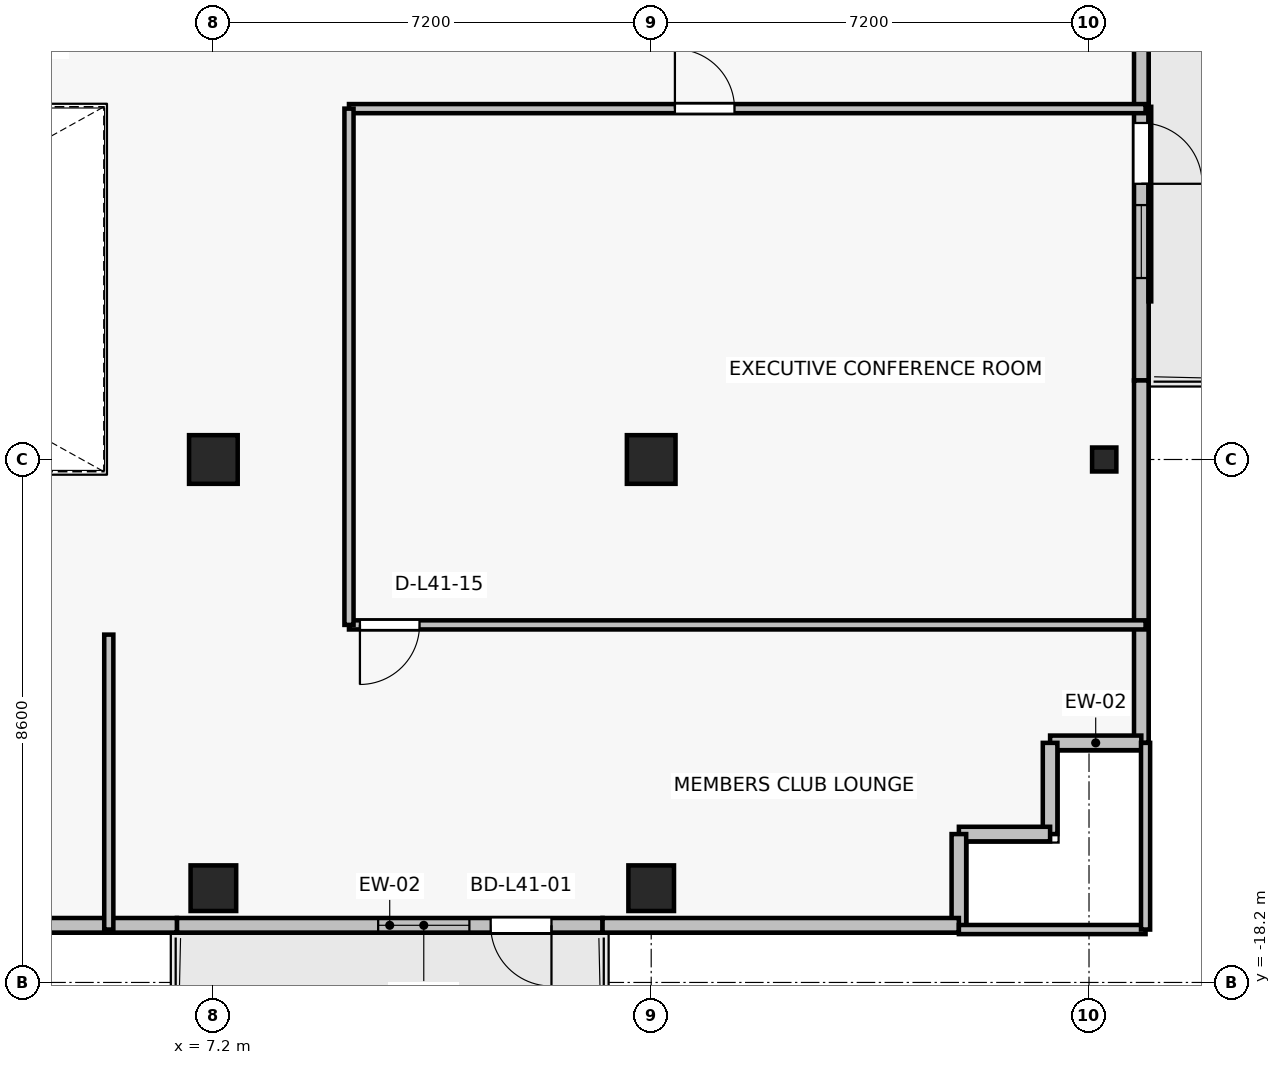
"""IFC4 building model, lengths in metres.
Left out: names, types, materials, properties, quantities, classifications, styles, units other than length and angle.
Written with IfcOpenShell. Run it as: python <this file> out.ifc"""

import sys

from ifc_helpers import new_model, si_unit, direction, frame, frame_2d, origin, origin_2d, place, context, subcontext, project, spatial, rectangle, i_section, extrude, source, transform, mapped, element, fill, save


model = new_model("IFC4")
c1 = context("Model", 3, precision=1e-05, world=origin(), true_north=direction((0.0, 1.0)))
c2 = subcontext(c1, "Body", "Model", "MODEL_VIEW")
j1 = project(units=[si_unit("LENGTHUNIT", "METRE"), si_unit("PLANEANGLEUNIT", "RADIAN")], contexts=[c1])
p1 = place(None, origin())
s1 = spatial("IfcSite", under=j1, at=p1, CompositionType="ELEMENT")
p2 = place(p1, origin())
s2 = spatial("IfcBuilding", under=s1, at=p2, CompositionType="ELEMENT")
p3 = place(p2, frame((0.0, 0.0, 149.5)))
s3 = spatial("IfcBuildingStorey", under=s2, at=p3, CompositionType="ELEMENT", Elevation=149.5)
for number, where, z_axis, x_axis in (
    (1, (7.2, -9.6, 0.0), (0.0, 0.0, 1.0), (1.0, 0.0, 0.0)),
    (2, (14.4, -9.6, 0.0), (0.0, 0.0, 1.0), (1.0, 0.0, 0.0)),
):
    element("IfcColumn", number, at=place(p3, frame(where, z_axis=z_axis, x_axis=x_axis)), inside=s3, PredefinedType="COLUMN", context=c2, shape_type="SweptSolid", body=[
        extrude(rectangle(XDim=0.8, YDim=0.8, at=origin_2d()), origin(), (0.0, 0.0, 1.0), 3.3),
    ])
for number, where, z_axis, x_axis in (
    (3, (7.2, -16.65, 0.0), (0.0, 0.0, 1.0), (1.0, 0.0, 0.0)),
    (4, (14.4, -16.65, 0.0), (0.0, 0.0, 1.0), (1.0, 0.0, 0.0)),
):
    element("IfcColumn", number, at=place(p3, frame(where, z_axis=z_axis, x_axis=x_axis)), inside=s3, PredefinedType="COLUMN", context=c2, shape_type="SweptSolid", body=[
        extrude(rectangle(XDim=0.75, YDim=0.75, at=origin_2d()), origin(), (0.0, 0.0, 1.0), 3.3),
    ])
p4 = place(p3, frame((21.85, -9.6, 0.0), z_axis=(0.0, 0.0, 1.0), x_axis=(1.0, 0.0, 0.0)))
e5 = element("IfcColumn", 5, at=p4, inside=s3, PredefinedType="COLUMN", context=c2, shape_type="SweptSolid", body=[
    extrude(i_section(OverallWidth=0.399, OverallDepth=0.394, WebThickness=0.023, FlangeThickness=0.037, FilletRadius=0.015, at=origin_2d()), origin(), (0.0, 0.0, 1.0), 3.3),
])
p5 = place(p3, frame((13.6, -17.26, 0.0), z_axis=(0.0, 0.0, 1.0), x_axis=(-1.0, 0.0, 0.0)))
e6 = element("IfcWall", 6, at=p5, inside=s3, PredefinedType="SOLIDWALL", context=c2, shape_type="SweptSolid", body=[
    extrude(rectangle(XDim=7.0, YDim=0.24, at=frame_2d((3.5, 0.0))), origin(), (0.0, 0.0, 1.0), 2.665),
])
p6 = place(p5, frame((0.84, 0.0, 0.0)))
e7 = element("IfcOpeningElement", 7, at=p6, cuts=e6, PredefinedType="OPENING", context=c2, shape_type="SweptSolid", body=[
    extrude(rectangle(XDim=1.0, YDim=2.2, at=frame_2d((0.5, 1.1))), frame((0.0, 0.13, 0.0), z_axis=(0.0, -1.0, 0.0), x_axis=(1.0, 0.0, 0.0)), (0.0, 0.0, 1.0), 0.26),
])
p7 = place(p5, frame((2.19, 0.0, 0.85)))
e8 = element("IfcOpeningElement", 8, at=p7, cuts=e6, PredefinedType="OPENING", context=c2, shape_type="SweptSolid", body=[
    extrude(rectangle(XDim=1.5, YDim=1.6, at=frame_2d((0.75, 0.8))), frame((0.0, 0.13, 0.0), z_axis=(0.0, -1.0, 0.0), x_axis=(1.0, 0.0, 0.0)), (0.0, 0.0, 1.0), 0.26),
])
p8 = place(p3, frame((22.46, -2.5, 0.0), z_axis=(0.0, 0.0, 1.0), x_axis=(0.0, -1.0, 0.0)))
e9 = element("IfcWall", 9, at=p8, inside=s3, PredefinedType="SOLIDWALL", context=c2, shape_type="SweptSolid", body=[
    extrude(rectangle(XDim=5.8, YDim=0.24, at=frame_2d((2.9, 0.0))), origin(), (0.0, 0.0, 1.0), 3.075),
])
p9 = place(p8, frame((1.566, 0.0, 0.0)))
e10 = element("IfcOpeningElement", 10, at=p9, cuts=e9, PredefinedType="OPENING", context=c2, shape_type="SweptSolid", body=[
    extrude(rectangle(XDim=1.0, YDim=2.2, at=frame_2d((0.5, 1.1))), frame((0.0, 0.13, 0.0), z_axis=(0.0, -1.0, 0.0), x_axis=(1.0, 0.0, 0.0)), (0.0, 0.0, 1.0), 0.26),
])
p10 = place(p8, frame((2.916, 0.0, 0.85)))
e11 = element("IfcOpeningElement", 11, at=p10, cuts=e9, PredefinedType="OPENING", context=c2, shape_type="SweptSolid", body=[
    extrude(rectangle(XDim=1.2, YDim=1.5, at=frame_2d((0.6, 0.75))), frame((0.0, 0.13, 0.0), z_axis=(0.0, -1.0, 0.0), x_axis=(1.0, 0.0, 0.0)), (0.0, 0.0, 1.0), 0.26),
])
p11 = place(p3, frame((22.46, -14.26, 0.0), z_axis=(0.0, 0.0, 1.0), x_axis=(0.0, 1.0, 0.0)))
e12 = element("IfcWall", 12, at=p11, inside=s3, PredefinedType="SOLIDWALL", context=c2, shape_type="SweptSolid", body=[
    extrude(rectangle(XDim=5.96, YDim=0.24, at=frame_2d((2.98, 0.0))), origin(), (0.0, 0.0, 1.0), 3.075),
])
for number, where, z_axis, x_axis in (
    (13, (20.96, -14.26, 0.0), (0.0, 0.0, 1.0), (1.0, 0.0, 0.0)),
    (14, (20.96, -15.76, 0.0), (0.0, 0.0, 1.0), (0.0, 1.0, 0.0)),
    (15, (19.46, -15.76, 0.0), (0.0, 0.0, 1.0), (1.0, 0.0, 0.0)),
    (16, (19.46, -17.26, 0.0), (0.0, 0.0, 1.0), (0.0, 1.0, 0.0)),
):
    element("IfcWall", number, at=place(p3, frame(where, z_axis=z_axis, x_axis=x_axis)), inside=s3, PredefinedType="SOLIDWALL", context=c2, shape_type="SweptSolid", body=[
        extrude(rectangle(XDim=1.5, YDim=0.24, at=frame_2d((0.75, 0.0))), origin(), (0.0, 0.0, 1.0), 3.075),
    ])
p12 = place(p3, frame((13.6, -17.26, 0.0), z_axis=(0.0, 0.0, 1.0), x_axis=(1.0, 0.0, 0.0)))
e17 = element("IfcWall", 17, at=p12, inside=s3, PredefinedType="SOLIDWALL", context=c2, shape_type="SweptSolid", body=[
    extrude(rectangle(XDim=5.86, YDim=0.24, at=frame_2d((2.93, 0.0))), origin(), (0.0, 0.0, 1.0), 2.665),
])
p13 = place(p3, frame((3.2, -17.26, 0.0), z_axis=(0.0, 0.0, 1.0), x_axis=(1.0, 0.0, 0.0)))
e18 = element("IfcWall", 18, at=p13, inside=s3, PredefinedType="SOLIDWALL", context=c2, shape_type="SweptSolid", body=[
    extrude(rectangle(XDim=3.4, YDim=0.24, at=frame_2d((1.7, 0.0))), origin(), (0.0, 0.0, 1.0), 3.075),
])
p14 = place(p3, frame((22.53, -12.32, 0.0), z_axis=(0.0, 0.0, 1.0), x_axis=(-1.0, 0.0, 0.0)))
e19 = element("IfcWall", 19, at=p14, inside=s3, PredefinedType="PARTITIONING", context=c2, shape_type="SweptSolid", body=[
    extrude(rectangle(XDim=13.1, YDim=0.15, at=frame_2d((6.55, 0.0))), origin(), (0.0, 0.0, 1.0), 2.565),
])
p15 = place(p14, frame((11.94, 0.0, 0.0)))
e20 = element("IfcOpeningElement", 20, at=p15, cuts=e19, PredefinedType="OPENING", context=c2, shape_type="SweptSolid", body=[
    extrude(rectangle(XDim=0.98, YDim=2.15, at=frame_2d((0.49, 1.075))), frame((0.0, 0.085, 0.0), z_axis=(0.0, -1.0, 0.0), x_axis=(1.0, 0.0, 0.0)), (0.0, 0.0, 1.0), 0.17),
])
p16 = place(p3, frame((9.43, -3.83, 0.0), z_axis=(0.0, 0.0, 1.0), x_axis=(1.0, 0.0, 0.0)))
e21 = element("IfcWall", 21, at=p16, inside=s3, PredefinedType="PARTITIONING", context=c2, shape_type="SweptSolid", body=[
    extrude(rectangle(XDim=13.1, YDim=0.15, at=frame_2d((6.55, 0.0))), origin(), (0.0, 0.0, 1.0), 2.565),
])
p17 = place(p16, frame((5.36, 0.0, 0.0)))
e22 = element("IfcOpeningElement", 22, at=p17, cuts=e21, PredefinedType="OPENING", context=c2, shape_type="SweptSolid", body=[
    extrude(rectangle(XDim=0.98, YDim=2.15, at=frame_2d((0.49, 1.075))), frame((0.0, 0.085, 0.0), z_axis=(0.0, -1.0, 0.0), x_axis=(1.0, 0.0, 0.0)), (0.0, 0.0, 1.0), 0.17),
])
p18 = place(p3, frame((9.43, -12.32, 0.0), z_axis=(0.0, 0.0, 1.0), x_axis=(0.0, 1.0, 0.0)))
e23 = element("IfcWall", 23, at=p18, inside=s3, PredefinedType="PARTITIONING", context=c2, shape_type="SweptSolid", body=[
    extrude(rectangle(XDim=8.49, YDim=0.15, at=frame_2d((4.245, 0.0))), origin(), (0.0, 0.0, 1.0), 2.565),
])
p19 = place(p3, frame((22.53, -17.33, 0.0), z_axis=(0.0, 0.0, 1.0), x_axis=(-1.0, 0.0, 0.0)))
e24 = element("IfcWall", 24, at=p19, inside=s3, PredefinedType="PARTITIONING", context=c2, shape_type="SweptSolid", body=[
    extrude(rectangle(XDim=3.07, YDim=0.15, at=frame_2d((1.535, 0.0))), origin(), (0.0, 0.0, 1.0), 2.665),
])
p20 = place(p3, frame((5.48, -17.33, 0.0), z_axis=(0.0, 0.0, 1.0), x_axis=(0.0, 1.0, 0.0)))
e25 = element("IfcWall", 25, at=p20, inside=s3, PredefinedType="PARTITIONING", context=c2, shape_type="SweptSolid", body=[
    extrude(rectangle(XDim=4.85, YDim=0.15, at=frame_2d((2.425, 0.0))), origin(), (0.0, 0.0, 1.0), 2.565),
])
p21 = place(p3, frame((22.53, -14.26, 0.0), z_axis=(0.0, 0.0, 1.0), x_axis=(0.0, -1.0, 0.0)))
e26 = element("IfcWall", 26, at=p21, inside=s3, PredefinedType="PARTITIONING", context=c2, shape_type="SweptSolid", body=[
    extrude(rectangle(XDim=3.07, YDim=0.15, at=frame_2d((1.535, 0.0))), origin(), (0.0, 0.0, 1.0), 3.075),
])
m1 = source(origin(), c2, "Body", "SweptSolid", [
    extrude(rectangle(XDim=1.0, YDim=2.2, at=frame_2d((0.5, 1.1))), frame((0.0, 0.025, 0.0), z_axis=(0.0, -1.0, 0.0), x_axis=(1.0, 0.0, 0.0)), (0.0, 0.0, 1.0), 0.05),
])
p22 = place(p6, origin())
e27 = element("IfcDoor", 27, at=p22, inside=s3, OperationType="SINGLE_SWING_LEFT", PredefinedType="DOOR", context=c2, shape_type="MappedRepresentation", body=[
    mapped(m1, transform((0.0, 0.0, 0.0), x_axis=(1.0, 0.0, 0.0), y_axis=(0.0, 1.0, 0.0), z_axis=(0.0, 0.0, 1.0), scale=1.0)),
])
fill(e7, e27)
m2 = source(origin(), c2, "Body", "SweptSolid", [
    extrude(rectangle(XDim=1.5, YDim=1.6, at=frame_2d((0.75, 0.8))), frame((0.0, 0.03, 0.0), z_axis=(0.0, -1.0, 0.0), x_axis=(1.0, 0.0, 0.0)), (0.0, 0.0, 1.0), 0.06),
])
p23 = place(p7, origin())
e28 = element("IfcWindow", 28, at=p23, inside=s3, PartitioningType="SINGLE_PANEL", PredefinedType="WINDOW", context=c2, shape_type="MappedRepresentation", body=[
    mapped(m2, transform((0.0, 0.0, 0.0), x_axis=(1.0, 0.0, 0.0), y_axis=(0.0, 1.0, 0.0), z_axis=(0.0, 0.0, 1.0), scale=1.0)),
])
fill(e8, e28)
p24 = place(p9, origin())
e29 = element("IfcDoor", 29, at=p24, inside=s3, OperationType="SINGLE_SWING_RIGHT", PredefinedType="DOOR", context=c2, shape_type="MappedRepresentation", body=[
    mapped(m1, transform((0.0, 0.0, 0.0), x_axis=(1.0, 0.0, 0.0), y_axis=(0.0, 1.0, 0.0), z_axis=(0.0, 0.0, 1.0), scale=1.0)),
])
fill(e10, e29)
m3 = source(origin(), c2, "Body", "SweptSolid", [
    extrude(rectangle(XDim=1.2, YDim=1.5, at=frame_2d((0.6, 0.75))), frame((0.0, 0.03, 0.0), z_axis=(0.0, -1.0, 0.0), x_axis=(1.0, 0.0, 0.0)), (0.0, 0.0, 1.0), 0.06),
])
p25 = place(p10, origin())
e30 = element("IfcWindow", 30, at=p25, inside=s3, PartitioningType="SINGLE_PANEL", PredefinedType="WINDOW", context=c2, shape_type="MappedRepresentation", body=[
    mapped(m3, transform((0.0, 0.0, 0.0), x_axis=(1.0, 0.0, 0.0), y_axis=(0.0, 1.0, 0.0), z_axis=(0.0, 0.0, 1.0), scale=1.0)),
])
fill(e11, e30)
m4 = source(origin(), c2, "Body", "SweptSolid", [
    extrude(rectangle(XDim=0.98, YDim=2.15, at=frame_2d((0.49, 1.075))), frame((0.0, 0.025, 0.0), z_axis=(0.0, -1.0, 0.0), x_axis=(1.0, 0.0, 0.0)), (0.0, 0.0, 1.0), 0.05),
])
p26 = place(p17, origin())
e31 = element("IfcDoor", 31, at=p26, inside=s3, OperationType="SINGLE_SWING_LEFT", PredefinedType="DOOR", context=c2, shape_type="MappedRepresentation", body=[
    mapped(m4, transform((0.0, 0.0, 0.0), x_axis=(1.0, 0.0, 0.0), y_axis=(0.0, 1.0, 0.0), z_axis=(0.0, 0.0, 1.0), scale=1.0)),
])
fill(e22, e31)
p27 = place(p15, origin())
e32 = element("IfcDoor", 32, at=p27, inside=s3, OperationType="SINGLE_SWING_RIGHT", PredefinedType="DOOR", context=c2, shape_type="MappedRepresentation", body=[
    mapped(m4, transform((0.0, 0.0, 0.0), x_axis=(1.0, 0.0, 0.0), y_axis=(0.0, 1.0, 0.0), z_axis=(0.0, 0.0, 1.0), scale=1.0)),
])
fill(e20, e32)
save(model, sys.argv[1])
